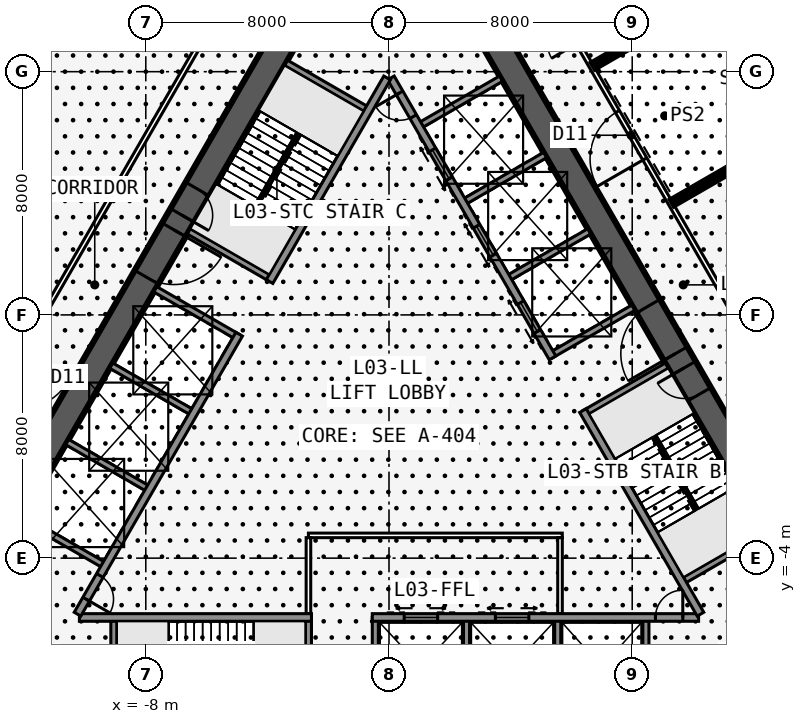
"""IFC4 building model, lengths in metres.
Left out: names, types, materials, properties, quantities, classifications, styles, units other than length and angle.
Written with IfcOpenShell. Run it as: python <this file> out.ifc"""

import sys

from ifc_helpers import new_model, si_unit, direction, frame, frame_2d, origin, place, context, subcontext, project, spatial, rectangle, extrude, element, fill, save


model = new_model("IFC4")
c1 = context("Model", 3, precision=1e-05, world=origin(), true_north=direction((0.0, 1.0)))
c2 = subcontext(c1, "Body", "Model", "MODEL_VIEW")
j1 = project(units=[si_unit("LENGTHUNIT", "METRE"), si_unit("PLANEANGLEUNIT", "RADIAN")], contexts=[c1])
p1 = place(None, origin())
s1 = spatial("IfcSite", under=j1, at=p1, CompositionType="ELEMENT")
p2 = place(p1, origin())
s2 = spatial("IfcBuilding", under=s1, at=p2, CompositionType="ELEMENT")
p3 = place(p2, frame((0.0, 0.0, 17.5)))
s3 = spatial("IfcBuildingStorey", under=s2, at=p3, CompositionType="ELEMENT", Elevation=17.5)
p4 = place(p3, frame((-10.183, -5.951, 0.0), z_axis=(0.0, 0.0, 1.0), x_axis=(1.0, 0.0, 0.0)))
e1 = element("IfcWall", 1, at=p4, inside=s3, PredefinedType="SOLIDWALL", context=c2, shape_type="SweptSolid", body=[
    extrude(rectangle(XDim=7.633, YDim=0.25, at=frame_2d((3.816, 0.0))), origin(), (0.0, 0.0, 1.0), 4.75),
])
p5 = place(p3, frame((-0.55, -5.951, 0.0), z_axis=(0.0, 0.0, 1.0), x_axis=(1.0, 0.0, 0.0)))
e2 = element("IfcWall", 2, at=p5, inside=s3, PredefinedType="SOLIDWALL", context=c2, shape_type="SweptSolid", body=[
    extrude(rectangle(XDim=10.733, YDim=0.25, at=frame_2d((5.366, 0.0))), origin(), (0.0, 0.0, 1.0), 4.75),
])
p6 = place(p5, frame((9.314, 0.0, 0.0)))
e3 = element("IfcOpeningElement", 3, at=p6, cuts=e2, PredefinedType="OPENING", context=c2, shape_type="SweptSolid", body=[
    extrude(rectangle(XDim=0.9, YDim=2.13, at=frame_2d((0.45, 1.065))), frame((0.0, 0.135, 0.0), z_axis=(0.0, -1.0, 0.0), x_axis=(1.0, 0.0, 0.0)), (0.0, 0.0, 1.0), 0.27),
])
p7 = place(p5, frame((1.05, 0.0, 0.0)))
e4 = element("IfcOpeningElement", 4, at=p7, cuts=e2, PredefinedType="OPENING", context=c2, shape_type="SweptSolid", body=[
    extrude(rectangle(XDim=1.1, YDim=2.13, at=frame_2d((0.55, 1.065))), frame((0.0, 0.135, 0.0), z_axis=(0.0, -1.0, 0.0), x_axis=(1.0, 0.0, 0.0)), (0.0, 0.0, 1.0), 0.27),
])
p8 = place(p5, frame((4.05, 0.0, 0.0)))
e5 = element("IfcOpeningElement", 5, at=p8, cuts=e2, PredefinedType="OPENING", context=c2, shape_type="SweptSolid", body=[
    extrude(rectangle(XDim=1.1, YDim=2.13, at=frame_2d((0.55, 1.065))), frame((0.0, 0.135, 0.0), z_axis=(0.0, -1.0, 0.0), x_axis=(1.0, 0.0, 0.0)), (0.0, 0.0, 1.0), 0.27),
])
p9 = place(p3, frame((-9.05, -5.951, 0.0), z_axis=(0.0, 0.0, 1.0), x_axis=(0.0, -1.0, 0.0)))
e6 = element("IfcWall", 6, at=p9, inside=s3, PredefinedType="SOLIDWALL", context=c2, shape_type="SweptSolid", body=[
    extrude(rectangle(XDim=3.125, YDim=0.2, at=frame_2d((1.562, 0.0))), origin(), (0.0, 0.0, 1.0), 4.75),
])
p10 = place(p3, frame((-2.65, -5.951, 0.0), z_axis=(0.0, 0.0, 1.0), x_axis=(0.0, -1.0, 0.0)))
e7 = element("IfcWall", 7, at=p10, inside=s3, PredefinedType="SOLIDWALL", context=c2, shape_type="SweptSolid", body=[
    extrude(rectangle(XDim=3.125, YDim=0.2, at=frame_2d((1.562, 0.0))), origin(), (0.0, 0.0, 1.0), 4.75),
])
p11 = place(p10, frame((1.525, 0.0, 0.0)))
e8 = element("IfcOpeningElement", 8, at=p11, cuts=e7, PredefinedType="OPENING", context=c2, shape_type="SweptSolid", body=[
    extrude(rectangle(XDim=1.0, YDim=2.13, at=frame_2d((0.5, 1.065))), frame((0.0, 0.11, 0.0), z_axis=(0.0, -1.0, 0.0), x_axis=(1.0, 0.0, 0.0)), (0.0, 0.0, 1.0), 0.22),
])
for number, where, z_axis, x_axis in (
    (9, (-0.45, -5.951, 0.0), (0.0, 0.0, 1.0), (0.0, -1.0, 0.0)),
    (10, (2.55, -5.951, 0.0), (0.0, 0.0, 1.0), (0.0, -1.0, 0.0)),
    (11, (5.55, -5.951, 0.0), (0.0, 0.0, 1.0), (0.0, -1.0, 0.0)),
    (12, (8.45, -5.951, 0.0), (0.0, 0.0, 1.0), (0.0, -1.0, 0.0)),
):
    element("IfcWall", number, at=place(p3, frame(where, z_axis=z_axis, x_axis=x_axis)), inside=s3, PredefinedType="SOLIDWALL", context=c2, shape_type="SweptSolid", body=[
        extrude(rectangle(XDim=3.125, YDim=0.2, at=frame_2d((1.562, 0.0))), origin(), (0.0, 0.0, 1.0), 4.75),
    ])
p12 = place(p3, frame((16.5, -9.526, 0.0), z_axis=(0.0, 0.0, 1.0), x_axis=(-0.499999749417, 0.866025548458, 0.0)))
e13 = element("IfcWall", 13, at=p12, inside=s3, PredefinedType="SHEAR", context=c2, shape_type="SweptSolid", body=[
    extrude(rectangle(XDim=33.0, YDim=0.9, at=frame_2d((16.5, 0.0))), origin(), (0.0, 0.0, 1.0), 5.0),
])
p13 = place(p12, frame((14.15, 0.0, 0.0)))
e14 = element("IfcOpeningElement", 14, at=p13, cuts=e13, PredefinedType="OPENING", context=c2, shape_type="SweptSolid", body=[
    extrude(rectangle(XDim=1.8, YDim=2.13, at=frame_2d((0.9, 1.065))), frame((0.0, 0.46, 0.0), z_axis=(0.0, -1.0, 0.0), x_axis=(1.0, 0.0, 0.0)), (0.0, 0.0, 1.0), 0.92),
])
p14 = place(p12, frame((12.6, 0.0, 0.0)))
e15 = element("IfcOpeningElement", 15, at=p14, cuts=e13, PredefinedType="OPENING", context=c2, shape_type="SweptSolid", body=[
    extrude(rectangle(XDim=1.0, YDim=2.13, at=frame_2d((0.5, 1.065))), frame((0.0, 0.46, 0.0), z_axis=(0.0, -1.0, 0.0), x_axis=(1.0, 0.0, 0.0)), (0.0, 0.0, 1.0), 0.92),
])
p15 = place(p3, frame((10.245, -5.843, 0.0), z_axis=(0.0, 0.0, 1.0), x_axis=(-0.499993009313, 0.866029439822, 0.0)))
e16 = element("IfcWall", 16, at=p15, inside=s3, PredefinedType="SOLIDWALL", context=c2, shape_type="SweptSolid", body=[
    extrude(rectangle(XDim=7.733, YDim=0.25, at=frame_2d((3.866, 0.0))), origin(), (0.0, 0.0, 1.0), 4.75),
])
p16 = place(p3, frame((5.379, 2.586, 0.0), z_axis=(0.0, 0.0, 1.0), x_axis=(-0.500001375892, 0.866024609411, 0.0)))
e17 = element("IfcWall", 17, at=p16, inside=s3, PredefinedType="SOLIDWALL", context=c2, shape_type="SweptSolid", body=[
    extrude(rectangle(XDim=10.633, YDim=0.25, at=frame_2d((5.316, 0.0))), origin(), (0.0, 0.0, 1.0), 4.75),
])
p17 = place(p16, frame((9.164, 0.0, 0.0)))
e18 = element("IfcOpeningElement", 18, at=p17, cuts=e17, PredefinedType="OPENING", context=c2, shape_type="SweptSolid", body=[
    extrude(rectangle(XDim=0.9, YDim=2.13, at=frame_2d((0.45, 1.065))), frame((0.0, 0.135, 0.0), z_axis=(0.0, -1.0, 0.0), x_axis=(1.0, 0.0, 0.0)), (0.0, 0.0, 1.0), 0.27),
])
p18 = place(p16, frame((1.0, 0.0, 0.0)))
e19 = element("IfcOpeningElement", 19, at=p18, cuts=e17, PredefinedType="OPENING", context=c2, shape_type="SweptSolid", body=[
    extrude(rectangle(XDim=1.1, YDim=2.13, at=frame_2d((0.55, 1.065))), frame((0.0, 0.135, 0.0), z_axis=(0.0, -1.0, 0.0), x_axis=(1.0, 0.0, 0.0)), (0.0, 0.0, 1.0), 0.27),
])
p19 = place(p16, frame((3.9, 0.0, 0.0)))
e20 = element("IfcOpeningElement", 20, at=p19, cuts=e17, PredefinedType="OPENING", context=c2, shape_type="SweptSolid", body=[
    extrude(rectangle(XDim=1.1, YDim=2.13, at=frame_2d((0.55, 1.065))), frame((0.0, 0.135, 0.0), z_axis=(0.0, -1.0, 0.0), x_axis=(1.0, 0.0, 0.0)), (0.0, 0.0, 1.0), 0.27),
])
p20 = place(p16, frame((6.8, 0.0, 0.0)))
e21 = element("IfcOpeningElement", 21, at=p20, cuts=e17, PredefinedType="OPENING", context=c2, shape_type="SweptSolid", body=[
    extrude(rectangle(XDim=1.1, YDim=2.13, at=frame_2d((0.55, 1.065))), frame((0.0, 0.135, 0.0), z_axis=(0.0, -1.0, 0.0), x_axis=(1.0, 0.0, 0.0)), (0.0, 0.0, 1.0), 0.27),
])
for number, where, z_axis, x_axis in (
    (22, (9.629, -4.775, 0.0), (0.0, 0.0, 1.0), (0.866, 0.5, 0.0)),
    (23, (6.429, 0.767, 0.0), (0.0, 0.0, 1.0), (0.866, 0.5, 0.0)),
    (24, (5.329, 2.673, 0.0), (0.0, 0.0, 1.0), (0.866, 0.5, 0.0)),
    (25, (3.879, 5.184, 0.0), (0.0, 0.0, 1.0), (0.866, 0.5, 0.0)),
    (26, (2.429, 7.696, 0.0), (0.0, 0.0, 1.0), (0.866, 0.5, 0.0)),
    (27, (0.979, 10.207, 0.0), (0.0, 0.0, 1.0), (0.866, 0.5, 0.0)),
):
    element("IfcWall", number, at=place(p3, frame(where, z_axis=z_axis, x_axis=x_axis)), inside=s3, PredefinedType="SOLIDWALL", context=c2, shape_type="SweptSolid", body=[
        extrude(rectangle(XDim=3.125, YDim=0.2, at=frame_2d((1.562, 0.0))), origin(), (0.0, 0.0, 1.0), 4.75),
    ])
p21 = place(p3, frame((0.0, 19.052, 0.0), z_axis=(0.0, 0.0, 1.0), x_axis=(-0.499999749417, -0.866025548458, 0.0)))
e28 = element("IfcWall", 28, at=p21, inside=s3, PredefinedType="SHEAR", context=c2, shape_type="SweptSolid", body=[
    extrude(rectangle(XDim=33.0, YDim=0.9, at=frame_2d((16.5, 0.0))), origin(), (0.0, 0.0, 1.0), 5.0),
])
p22 = place(p21, frame((14.15, 0.0, 0.0)))
e29 = element("IfcOpeningElement", 29, at=p22, cuts=e28, PredefinedType="OPENING", context=c2, shape_type="SweptSolid", body=[
    extrude(rectangle(XDim=1.8, YDim=2.13, at=frame_2d((0.9, 1.065))), frame((0.0, 0.46, 0.0), z_axis=(0.0, -1.0, 0.0), x_axis=(1.0, 0.0, 0.0)), (0.0, 0.0, 1.0), 0.92),
])
p23 = place(p21, frame((12.6, 0.0, 0.0)))
e30 = element("IfcOpeningElement", 30, at=p23, cuts=e28, PredefinedType="OPENING", context=c2, shape_type="SweptSolid", body=[
    extrude(rectangle(XDim=1.0, YDim=2.13, at=frame_2d((0.5, 1.065))), frame((0.0, 0.46, 0.0), z_axis=(0.0, -1.0, 0.0), x_axis=(1.0, 0.0, 0.0)), (0.0, 0.0, 1.0), 0.92),
])
p24 = place(p3, frame((-0.062, 11.794, 0.0), z_axis=(0.0, 0.0, 1.0), x_axis=(-0.500006680225, -0.86602154692, 0.0)))
e31 = element("IfcWall", 31, at=p24, inside=s3, PredefinedType="SOLIDWALL", context=c2, shape_type="SweptSolid", body=[
    extrude(rectangle(XDim=7.733, YDim=0.25, at=frame_2d((3.866, 0.0))), origin(), (0.0, 0.0, 1.0), 4.75),
])
p25 = place(p3, frame((-4.929, 3.365, 0.0), z_axis=(0.0, 0.0, 1.0), x_axis=(-0.499991433582, -0.866030349552, 0.0)))
e32 = element("IfcWall", 32, at=p25, inside=s3, PredefinedType="SOLIDWALL", context=c2, shape_type="SweptSolid", body=[
    extrude(rectangle(XDim=10.633, YDim=0.25, at=frame_2d((5.316, 0.0))), origin(), (0.0, 0.0, 1.0), 4.75),
])
p26 = place(p25, frame((9.164, 0.0, 0.0)))
e33 = element("IfcOpeningElement", 33, at=p26, cuts=e32, PredefinedType="OPENING", context=c2, shape_type="SweptSolid", body=[
    extrude(rectangle(XDim=0.9, YDim=2.13, at=frame_2d((0.45, 1.065))), frame((0.0, 0.135, 0.0), z_axis=(0.0, -1.0, 0.0), x_axis=(1.0, 0.0, 0.0)), (0.0, 0.0, 1.0), 0.27),
])
for number, where, z_axis, x_axis in (
    (34, (-0.679, 10.727, 0.0), (0.0, 0.0, 1.0), (-0.866, 0.5, 0.0)),
    (35, (-3.879, 5.184, 0.0), (0.0, 0.0, 1.0), (-0.866, 0.5, 0.0)),
    (36, (-4.979, 3.279, 0.0), (0.0, 0.0, 1.0), (-0.866, 0.5, 0.0)),
    (37, (-6.429, 0.767, 0.0), (0.0, 0.0, 1.0), (-0.866, 0.5, 0.0)),
    (38, (-7.879, -1.744, 0.0), (0.0, 0.0, 1.0), (-0.866, 0.5, 0.0)),
    (39, (-9.329, -4.256, 0.0), (0.0, 0.0, 1.0), (-0.866, 0.5, 0.0)),
):
    element("IfcWall", number, at=place(p3, frame(where, z_axis=z_axis, x_axis=x_axis)), inside=s3, PredefinedType="SOLIDWALL", context=c2, shape_type="SweptSolid", body=[
        extrude(rectangle(XDim=3.125, YDim=0.2, at=frame_2d((1.562, 0.0))), origin(), (0.0, 0.0, 1.0), 4.75),
    ])
p27 = place(p3, frame((20.027, -10.985, 0.0), z_axis=(0.0, 0.0, 1.0), x_axis=(-0.500001677587, 0.866024435227, 0.0)))
e40 = element("IfcWall", 40, at=p27, inside=s3, PredefinedType="PARTITIONING", context=c2, shape_type="SweptSolid", body=[
    extrude(rectangle(XDim=39.054, YDim=0.15, at=frame_2d((19.527, 0.0))), origin(), (0.0, 0.0, 1.0), 4.75),
])
p28 = place(p27, frame((10.013, 0.0, 0.0)))
e41 = element("IfcOpeningElement", 41, at=p28, cuts=e40, PredefinedType="OPENING", context=c2, shape_type="SweptSolid", body=[
    extrude(rectangle(XDim=1.8, YDim=2.13, at=frame_2d((0.9, 1.065))), frame((0.0, 0.085, 0.0), z_axis=(0.0, -1.0, 0.0), x_axis=(1.0, 0.0, 0.0)), (0.0, 0.0, 1.0), 0.17),
])
p29 = place(p27, frame((23.227, 0.0, 0.0)))
e42 = element("IfcOpeningElement", 42, at=p29, cuts=e40, PredefinedType="OPENING", context=c2, shape_type="SweptSolid", body=[
    extrude(rectangle(XDim=1.8, YDim=2.13, at=frame_2d((0.9, 1.065))), frame((0.0, 0.085, 0.0), z_axis=(0.0, -1.0, 0.0), x_axis=(1.0, 0.0, 0.0)), (0.0, 0.0, 1.0), 0.17),
])
p30 = place(p27, frame((27.627, 0.0, 0.0)))
e43 = element("IfcOpeningElement", 43, at=p30, cuts=e40, PredefinedType="OPENING", context=c2, shape_type="SweptSolid", body=[
    extrude(rectangle(XDim=1.0, YDim=2.13, at=frame_2d((0.5, 1.065))), frame((0.0, 0.085, 0.0), z_axis=(0.0, -1.0, 0.0), x_axis=(1.0, 0.0, 0.0)), (0.0, 0.0, 1.0), 0.17),
])
p31 = place(p27, frame((30.527, 0.0, 0.0)))
e44 = element("IfcOpeningElement", 44, at=p31, cuts=e40, PredefinedType="OPENING", context=c2, shape_type="SweptSolid", body=[
    extrude(rectangle(XDim=1.0, YDim=2.13, at=frame_2d((0.5, 1.065))), frame((0.0, 0.085, 0.0), z_axis=(0.0, -1.0, 0.0), x_axis=(1.0, 0.0, 0.0)), (0.0, 0.0, 1.0), 0.17),
])
p32 = place(p27, frame((33.277, 0.0, 0.0)))
e45 = element("IfcOpeningElement", 45, at=p32, cuts=e40, PredefinedType="OPENING", context=c2, shape_type="SweptSolid", body=[
    extrude(rectangle(XDim=1.0, YDim=2.13, at=frame_2d((0.5, 1.065))), frame((0.0, 0.085, 0.0), z_axis=(0.0, -1.0, 0.0), x_axis=(1.0, 0.0, 0.0)), (0.0, 0.0, 1.0), 0.17),
])
p33 = place(p27, frame((36.39, 0.0, 0.0)))
e46 = element("IfcOpeningElement", 46, at=p33, cuts=e40, PredefinedType="OPENING", context=c2, shape_type="SweptSolid", body=[
    extrude(rectangle(XDim=1.0, YDim=2.13, at=frame_2d((0.5, 1.065))), frame((0.0, 0.085, 0.0), z_axis=(0.0, -1.0, 0.0), x_axis=(1.0, 0.0, 0.0)), (0.0, 0.0, 1.0), 0.17),
])
p34 = place(p3, frame((9.329, 7.695, 0.0), z_axis=(0.0, 0.0, 1.0), x_axis=(0.866032486376, 0.49998773239, 0.0)))
e47 = element("IfcWall", 47, at=p34, inside=s3, PredefinedType="SHEAR", context=c2, shape_type="SweptSolid", body=[
    extrude(rectangle(XDim=10.595, YDim=0.2, at=frame_2d((5.298, 0.0))), origin(), (0.0, 0.0, 1.0), 5.0),
])
p35 = place(p3, frame((6.729, 12.198, 0.0), z_axis=(0.0, 0.0, 1.0), x_axis=(0.866025701527, 0.499999484295, 0.0)))
e48 = element("IfcWall", 48, at=p35, inside=s3, PredefinedType="SHEAR", context=c2, shape_type="SweptSolid", body=[
    extrude(rectangle(XDim=10.502, YDim=0.2, at=frame_2d((5.251, 0.0))), origin(), (0.0, 0.0, 1.0), 5.0),
])
p36 = place(p3, frame((-0.5, 22.836, 0.0), z_axis=(0.0, 0.0, 1.0), x_axis=(-0.500001677587, -0.866024435227, 0.0)))
e49 = element("IfcWall", 49, at=p36, inside=s3, PredefinedType="PARTITIONING", context=c2, shape_type="SweptSolid", body=[
    extrude(rectangle(XDim=39.054, YDim=0.15, at=frame_2d((19.527, 0.0))), origin(), (0.0, 0.0, 1.0), 4.75),
])
p37 = place(p36, frame((10.414, 0.0, 0.0)))
e50 = element("IfcOpeningElement", 50, at=p37, cuts=e49, PredefinedType="OPENING", context=c2, shape_type="SweptSolid", body=[
    extrude(rectangle(XDim=1.0, YDim=2.13, at=frame_2d((0.5, 1.065))), frame((0.0, 0.085, 0.0), z_axis=(0.0, -1.0, 0.0), x_axis=(1.0, 0.0, 0.0)), (0.0, 0.0, 1.0), 0.17),
])
p38 = place(p36, frame((23.227, 0.0, 0.0)))
e51 = element("IfcOpeningElement", 51, at=p38, cuts=e49, PredefinedType="OPENING", context=c2, shape_type="SweptSolid", body=[
    extrude(rectangle(XDim=1.8, YDim=2.13, at=frame_2d((0.9, 1.065))), frame((0.0, 0.085, 0.0), z_axis=(0.0, -1.0, 0.0), x_axis=(1.0, 0.0, 0.0)), (0.0, 0.0, 1.0), 0.17),
])
p39 = place(p36, frame((27.627, 0.0, 0.0)))
e52 = element("IfcOpeningElement", 52, at=p39, cuts=e49, PredefinedType="OPENING", context=c2, shape_type="SweptSolid", body=[
    extrude(rectangle(XDim=1.0, YDim=2.13, at=frame_2d((0.5, 1.065))), frame((0.0, 0.085, 0.0), z_axis=(0.0, -1.0, 0.0), x_axis=(1.0, 0.0, 0.0)), (0.0, 0.0, 1.0), 0.17),
])
p40 = place(p36, frame((30.277, 0.0, 0.0)))
e53 = element("IfcOpeningElement", 53, at=p40, cuts=e49, PredefinedType="OPENING", context=c2, shape_type="SweptSolid", body=[
    extrude(rectangle(XDim=1.0, YDim=2.13, at=frame_2d((0.5, 1.065))), frame((0.0, 0.085, 0.0), z_axis=(0.0, -1.0, 0.0), x_axis=(1.0, 0.0, 0.0)), (0.0, 0.0, 1.0), 0.17),
])
p41 = place(p36, frame((34.89, 0.0, 0.0)))
e54 = element("IfcOpeningElement", 54, at=p41, cuts=e49, PredefinedType="OPENING", context=c2, shape_type="SweptSolid", body=[
    extrude(rectangle(XDim=1.0, YDim=2.13, at=frame_2d((0.5, 1.065))), frame((0.0, 0.085, 0.0), z_axis=(0.0, -1.0, 0.0), x_axis=(1.0, 0.0, 0.0)), (0.0, 0.0, 1.0), 0.17),
])
p42 = place(p3, frame((-2.65, -3.251, 0.0), z_axis=(0.0, 0.0, 1.0), x_axis=(1.0, 0.0, 0.0)))
e55 = element("IfcWall", 55, at=p42, inside=s3, PredefinedType="PARTITIONING", context=c2, shape_type="SweptSolid", body=[
    extrude(rectangle(XDim=8.35, YDim=0.15, at=frame_2d((4.175, 0.0))), origin(), (0.0, 0.0, 1.0), 4.75),
])
for number, where, z_axis, x_axis in (
    (56, (-2.65, -5.826, 0.0), (0.0, 0.0, 1.0), (0.0, 1.0, 0.0)),
    (57, (5.625, -5.826, 0.0), (0.0, 0.0, 1.0), (0.0, 1.0, 0.0)),
):
    element("IfcWall", number, at=place(p3, frame(where, z_axis=z_axis, x_axis=x_axis)), inside=s3, PredefinedType="PARTITIONING", context=c2, shape_type="SweptSolid", body=[
        extrude(rectangle(XDim=2.5, YDim=0.15, at=frame_2d((1.25, 0.0))), origin(), (0.0, 0.0, 1.0), 4.75),
    ])
for number, where, z_axis, x_axis in (
    (58, (10.135, -2.401, 0.0), (0.0, 0.0, 1.0), (-0.5, 0.866, 0.0)),
    (59, (-2.988, 9.978, 0.0), (0.0, 0.0, 1.0), (-0.5, -0.866, 0.0)),
):
    element("IfcWall", number, at=place(p3, frame(where, z_axis=z_axis, x_axis=x_axis)), inside=s3, PredefinedType="SOLIDWALL", context=c2, shape_type="SweptSolid", body=[
        extrude(rectangle(XDim=2.794, YDim=0.1, at=frame_2d((1.397, 0.0))), origin(), (0.0, 0.0, 1.0), 5.0),
    ])
p43 = place(p29, origin())
e60 = element("IfcDoor", 60, at=p43, inside=s3, OperationType="DOUBLE_DOOR_SINGLE_SWING", PredefinedType="DOOR", context=c2, shape_type="SweptSolid", body=[
    extrude(rectangle(XDim=1.8, YDim=2.13, at=frame_2d((0.9, 1.065))), frame((0.0, 0.025, 0.0), z_axis=(0.0, -1.0, 0.0), x_axis=(1.0, 0.0, 0.0)), (0.0, 0.0, 1.0), 0.05),
])
fill(e42, e60)
p44 = place(p13, origin())
e61 = element("IfcDoor", 61, at=p44, inside=s3, OperationType="DOUBLE_DOOR_SINGLE_SWING", PredefinedType="DOOR", context=c2, shape_type="SweptSolid", body=[
    extrude(rectangle(XDim=1.8, YDim=2.13, at=frame_2d((0.9, 1.065))), frame((0.0, 0.025, 0.0), z_axis=(0.0, -1.0, 0.0), x_axis=(1.0, 0.0, 0.0)), (0.0, 0.0, 1.0), 0.05),
])
fill(e14, e61)
p45 = place(p14, origin())
e62 = element("IfcDoor", 62, at=p45, inside=s3, OperationType="SINGLE_SWING_RIGHT", PredefinedType="DOOR", context=c2, shape_type="SweptSolid", body=[
    extrude(rectangle(XDim=1.0, YDim=2.13, at=frame_2d((0.5, 1.065))), frame((0.0, 0.025, 0.0), z_axis=(0.0, -1.0, 0.0), x_axis=(1.0, 0.0, 0.0)), (0.0, 0.0, 1.0), 0.05),
])
fill(e15, e62)
p46 = place(p22, origin())
e63 = element("IfcDoor", 63, at=p46, inside=s3, OperationType="DOUBLE_DOOR_SINGLE_SWING", PredefinedType="DOOR", context=c2, shape_type="SweptSolid", body=[
    extrude(rectangle(XDim=1.8, YDim=2.13, at=frame_2d((0.9, 1.065))), frame((0.0, 0.025, 0.0), z_axis=(0.0, -1.0, 0.0), x_axis=(1.0, 0.0, 0.0)), (0.0, 0.0, 1.0), 0.05),
])
fill(e29, e63)
p47 = place(p23, origin())
e64 = element("IfcDoor", 64, at=p47, inside=s3, OperationType="SINGLE_SWING_RIGHT", PredefinedType="DOOR", context=c2, shape_type="SweptSolid", body=[
    extrude(rectangle(XDim=1.0, YDim=2.13, at=frame_2d((0.5, 1.065))), frame((0.0, 0.025, 0.0), z_axis=(0.0, -1.0, 0.0), x_axis=(1.0, 0.0, 0.0)), (0.0, 0.0, 1.0), 0.05),
])
fill(e30, e64)
p48 = place(p6, origin())
e65 = element("IfcDoor", 65, at=p48, inside=s3, OperationType="SINGLE_SWING_RIGHT", PredefinedType="DOOR", context=c2, shape_type="SweptSolid", body=[
    extrude(rectangle(XDim=0.9, YDim=2.13, at=frame_2d((0.45, 1.065))), frame((0.0, 0.025, 0.0), z_axis=(0.0, -1.0, 0.0), x_axis=(1.0, 0.0, 0.0)), (0.0, 0.0, 1.0), 0.05),
])
fill(e3, e65)
p49 = place(p17, origin())
e66 = element("IfcDoor", 66, at=p49, inside=s3, OperationType="SINGLE_SWING_RIGHT", PredefinedType="DOOR", context=c2, shape_type="SweptSolid", body=[
    extrude(rectangle(XDim=0.9, YDim=2.13, at=frame_2d((0.45, 1.065))), frame((0.0, 0.025, 0.0), z_axis=(0.0, -1.0, 0.0), x_axis=(1.0, 0.0, 0.0)), (0.0, 0.0, 1.0), 0.05),
])
fill(e18, e66)
p50 = place(p26, origin())
e67 = element("IfcDoor", 67, at=p50, inside=s3, OperationType="SINGLE_SWING_RIGHT", PredefinedType="DOOR", context=c2, shape_type="SweptSolid", body=[
    extrude(rectangle(XDim=0.9, YDim=2.13, at=frame_2d((0.45, 1.065))), frame((0.0, 0.025, 0.0), z_axis=(0.0, -1.0, 0.0), x_axis=(1.0, 0.0, 0.0)), (0.0, 0.0, 1.0), 0.05),
])
fill(e33, e67)
p51 = place(p7, origin())
e68 = element("IfcDoor", 68, at=p51, inside=s3, OperationType="DOUBLE_DOOR_SLIDING", PredefinedType="USERDEFINED", context=c2, shape_type="SweptSolid", body=[
    extrude(rectangle(XDim=1.1, YDim=2.13, at=frame_2d((0.55, 1.065))), frame((0.0, 0.025, 0.0), z_axis=(0.0, -1.0, 0.0), x_axis=(1.0, 0.0, 0.0)), (0.0, 0.0, 1.0), 0.05),
])
fill(e4, e68)
p52 = place(p8, origin())
e69 = element("IfcDoor", 69, at=p52, inside=s3, OperationType="DOUBLE_DOOR_SLIDING", PredefinedType="USERDEFINED", context=c2, shape_type="SweptSolid", body=[
    extrude(rectangle(XDim=1.1, YDim=2.13, at=frame_2d((0.55, 1.065))), frame((0.0, 0.025, 0.0), z_axis=(0.0, -1.0, 0.0), x_axis=(1.0, 0.0, 0.0)), (0.0, 0.0, 1.0), 0.05),
])
fill(e5, e69)
p53 = place(p18, origin())
e70 = element("IfcDoor", 70, at=p53, inside=s3, OperationType="DOUBLE_DOOR_SLIDING", PredefinedType="USERDEFINED", context=c2, shape_type="SweptSolid", body=[
    extrude(rectangle(XDim=1.1, YDim=2.13, at=frame_2d((0.55, 1.065))), frame((0.0, 0.025, 0.0), z_axis=(0.0, -1.0, 0.0), x_axis=(1.0, 0.0, 0.0)), (0.0, 0.0, 1.0), 0.05),
])
fill(e19, e70)
p54 = place(p19, origin())
e71 = element("IfcDoor", 71, at=p54, inside=s3, OperationType="DOUBLE_DOOR_SLIDING", PredefinedType="USERDEFINED", context=c2, shape_type="SweptSolid", body=[
    extrude(rectangle(XDim=1.1, YDim=2.13, at=frame_2d((0.55, 1.065))), frame((0.0, 0.025, 0.0), z_axis=(0.0, -1.0, 0.0), x_axis=(1.0, 0.0, 0.0)), (0.0, 0.0, 1.0), 0.05),
])
fill(e20, e71)
p55 = place(p20, origin())
e72 = element("IfcDoor", 72, at=p55, inside=s3, OperationType="DOUBLE_DOOR_SLIDING", PredefinedType="USERDEFINED", context=c2, shape_type="SweptSolid", body=[
    extrude(rectangle(XDim=1.1, YDim=2.13, at=frame_2d((0.55, 1.065))), frame((0.0, 0.025, 0.0), z_axis=(0.0, -1.0, 0.0), x_axis=(1.0, 0.0, 0.0)), (0.0, 0.0, 1.0), 0.05),
])
fill(e21, e72)
save(model, sys.argv[1])
